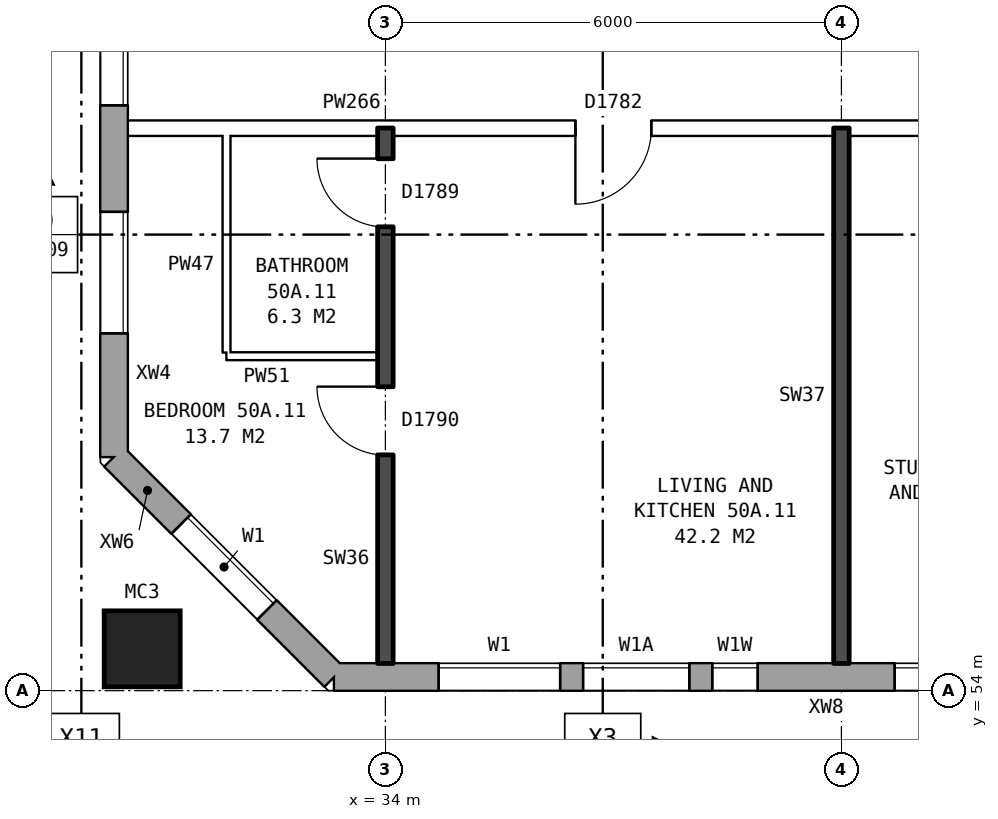
"""IFC4 building model, lengths in metres.
Left out: names, types, materials, properties, quantities, classifications, styles, units other than length and angle.
Written with IfcOpenShell. Run it as: python <this file> out.ifc"""

import sys

from ifc_helpers import new_model, si_unit, direction, frame, frame_2d, origin, origin_2d, place, context, subcontext, project, spatial, rectangle, hollow_rectangle, extrude, element, fill, save


model = new_model("IFC4")
c1 = context("Model", 3, precision=1e-05, world=origin(), true_north=direction((0.0, 1.0)))
c2 = subcontext(c1, "Body", "Model", "MODEL_VIEW")
j1 = project(units=[si_unit("LENGTHUNIT", "METRE"), si_unit("PLANEANGLEUNIT", "RADIAN")], contexts=[c1])
p1 = place(None, origin())
s1 = spatial("IfcSite", under=j1, at=p1, CompositionType="ELEMENT")
p2 = place(p1, origin())
s2 = spatial("IfcBuilding", under=s1, at=p2, CompositionType="ELEMENT")
p3 = place(p2, frame((0.0, 0.0, 178.9)))
s3 = spatial("IfcBuildingStorey", under=s2, at=p3, CompositionType="ELEMENT", Elevation=178.9)
p4 = place(p3, frame((30.8, 54.55, 0.0), z_axis=(0.0, 0.0, 1.0), x_axis=(1.0, 0.0, 0.0)))
e1 = element("IfcColumn", 1, at=p4, inside=s3, PredefinedType="COLUMN", context=c2, shape_type="SweptSolid", body=[
    extrude(hollow_rectangle(XDim=1.0, YDim=1.0, WallThickness=0.055, at=origin_2d()), origin(), (0.0, 0.0, 1.0), 3.1),
])
p5 = place(p3, frame((30.43, 57.075, 0.0), z_axis=(0.0, 0.0, 1.0), x_axis=(0.707106781187, -0.707106781187, 0.0)))
e2 = element("IfcWall", 2, at=p5, inside=s3, PredefinedType="STANDARD", context=c2, shape_type="SweptSolid", body=[
    extrude(rectangle(XDim=4.094, YDim=0.36, at=frame_2d((2.047, 0.0))), origin(), (0.0, 0.0, 1.0), 2.85),
])
p6 = place(p5, frame((1.247, 0.0, 0.8)))
e3 = element("IfcOpeningElement", 3, at=p6, cuts=e2, PredefinedType="OPENING", context=c2, shape_type="SweptSolid", body=[
    extrude(rectangle(XDim=1.6, YDim=1.8, at=frame_2d((0.8, 0.9))), frame((0.0, 0.19, 0.0), z_axis=(0.0, -1.0, 0.0), x_axis=(1.0, 0.0, 0.0)), (0.0, 0.0, 1.0), 0.38),
])
p7 = place(p3, frame((33.325, 54.18, 0.0), z_axis=(0.0, 0.0, 1.0), x_axis=(1.0, 0.0, 0.0)))
e4 = element("IfcWall", 4, at=p7, inside=s3, PredefinedType="STANDARD", context=c2, shape_type="SweptSolid", body=[
    extrude(rectangle(XDim=39.601, YDim=0.36, at=frame_2d((19.8, 0.0))), origin(), (0.0, 0.0, 1.0), 2.85),
])
p8 = place(p7, frame((1.375, 0.0, 0.8)))
e5 = element("IfcOpeningElement", 5, at=p8, cuts=e4, PredefinedType="OPENING", context=c2, shape_type="SweptSolid", body=[
    extrude(rectangle(XDim=1.6, YDim=1.8, at=frame_2d((0.8, 0.9))), frame((0.0, 0.19, 0.0), z_axis=(0.0, -1.0, 0.0), x_axis=(1.0, 0.0, 0.0)), (0.0, 0.0, 1.0), 0.38),
])
p9 = place(p7, frame((3.275, 0.0, 0.8)))
e6 = element("IfcOpeningElement", 6, at=p9, cuts=e4, PredefinedType="OPENING", context=c2, shape_type="SweptSolid", body=[
    extrude(rectangle(XDim=1.4, YDim=1.8, at=frame_2d((0.7, 0.9))), frame((0.0, 0.19, 0.0), z_axis=(0.0, -1.0, 0.0), x_axis=(1.0, 0.0, 0.0)), (0.0, 0.0, 1.0), 0.38),
])
p10 = place(p7, frame((7.375, 0.0, 0.8)))
e7 = element("IfcOpeningElement", 7, at=p10, cuts=e4, PredefinedType="OPENING", context=c2, shape_type="SweptSolid", body=[
    extrude(rectangle(XDim=1.6, YDim=1.8, at=frame_2d((0.8, 0.9))), frame((0.0, 0.19, 0.0), z_axis=(0.0, -1.0, 0.0), x_axis=(1.0, 0.0, 0.0)), (0.0, 0.0, 1.0), 0.38),
])
p11 = place(p7, frame((10.375, 0.0, 0.8)))
e8 = element("IfcOpeningElement", 8, at=p11, cuts=e4, PredefinedType="OPENING", context=c2, shape_type="SweptSolid", body=[
    extrude(rectangle(XDim=1.6, YDim=1.8, at=frame_2d((0.8, 0.9))), frame((0.0, 0.19, 0.0), z_axis=(0.0, -1.0, 0.0), x_axis=(1.0, 0.0, 0.0)), (0.0, 0.0, 1.0), 0.38),
])
p12 = place(p7, frame((13.375, 0.0, 0.8)))
e9 = element("IfcOpeningElement", 9, at=p12, cuts=e4, PredefinedType="OPENING", context=c2, shape_type="SweptSolid", body=[
    extrude(rectangle(XDim=1.6, YDim=1.8, at=frame_2d((0.8, 0.9))), frame((0.0, 0.19, 0.0), z_axis=(0.0, -1.0, 0.0), x_axis=(1.0, 0.0, 0.0)), (0.0, 0.0, 1.0), 0.38),
])
p13 = place(p7, frame((16.375, 0.0, 0.8)))
e10 = element("IfcOpeningElement", 10, at=p13, cuts=e4, PredefinedType="OPENING", context=c2, shape_type="SweptSolid", body=[
    extrude(rectangle(XDim=1.6, YDim=1.8, at=frame_2d((0.8, 0.9))), frame((0.0, 0.19, 0.0), z_axis=(0.0, -1.0, 0.0), x_axis=(1.0, 0.0, 0.0)), (0.0, 0.0, 1.0), 0.38),
])
p14 = place(p7, frame((19.375, 0.0, 0.8)))
e11 = element("IfcOpeningElement", 11, at=p14, cuts=e4, PredefinedType="OPENING", context=c2, shape_type="SweptSolid", body=[
    extrude(rectangle(XDim=1.6, YDim=1.8, at=frame_2d((0.8, 0.9))), frame((0.0, 0.19, 0.0), z_axis=(0.0, -1.0, 0.0), x_axis=(1.0, 0.0, 0.0)), (0.0, 0.0, 1.0), 0.38),
])
p15 = place(p7, frame((22.375, 0.0, 0.8)))
e12 = element("IfcOpeningElement", 12, at=p15, cuts=e4, PredefinedType="OPENING", context=c2, shape_type="SweptSolid", body=[
    extrude(rectangle(XDim=1.6, YDim=1.8, at=frame_2d((0.8, 0.9))), frame((0.0, 0.19, 0.0), z_axis=(0.0, -1.0, 0.0), x_axis=(1.0, 0.0, 0.0)), (0.0, 0.0, 1.0), 0.38),
])
p16 = place(p7, frame((25.375, 0.0, 0.8)))
e13 = element("IfcOpeningElement", 13, at=p16, cuts=e4, PredefinedType="OPENING", context=c2, shape_type="SweptSolid", body=[
    extrude(rectangle(XDim=1.6, YDim=1.8, at=frame_2d((0.8, 0.9))), frame((0.0, 0.19, 0.0), z_axis=(0.0, -1.0, 0.0), x_axis=(1.0, 0.0, 0.0)), (0.0, 0.0, 1.0), 0.38),
])
p17 = place(p7, frame((28.375, 0.0, 0.8)))
e14 = element("IfcOpeningElement", 14, at=p17, cuts=e4, PredefinedType="OPENING", context=c2, shape_type="SweptSolid", body=[
    extrude(rectangle(XDim=1.6, YDim=1.8, at=frame_2d((0.8, 0.9))), frame((0.0, 0.19, 0.0), z_axis=(0.0, -1.0, 0.0), x_axis=(1.0, 0.0, 0.0)), (0.0, 0.0, 1.0), 0.38),
])
p18 = place(p7, frame((30.875, 0.0, 0.8)))
e15 = element("IfcOpeningElement", 15, at=p18, cuts=e4, PredefinedType="OPENING", context=c2, shape_type="SweptSolid", body=[
    extrude(rectangle(XDim=1.0, YDim=1.8, at=frame_2d((0.5, 0.9))), frame((0.0, 0.19, 0.0), z_axis=(0.0, -1.0, 0.0), x_axis=(1.0, 0.0, 0.0)), (0.0, 0.0, 1.0), 0.38),
])
p19 = place(p7, frame((32.175, 0.0, 0.8)))
e16 = element("IfcOpeningElement", 16, at=p19, cuts=e4, PredefinedType="OPENING", context=c2, shape_type="SweptSolid", body=[
    extrude(rectangle(XDim=0.6, YDim=0.9, at=frame_2d((0.3, 0.45))), frame((0.0, 0.19, 0.0), z_axis=(0.0, -1.0, 0.0), x_axis=(1.0, 0.0, 0.0)), (0.0, 0.0, 1.0), 0.38),
])
p20 = place(p7, frame((37.375, 0.0, 0.8)))
e17 = element("IfcOpeningElement", 17, at=p20, cuts=e4, PredefinedType="OPENING", context=c2, shape_type="SweptSolid", body=[
    extrude(rectangle(XDim=1.6, YDim=1.8, at=frame_2d((0.8, 0.9))), frame((0.0, 0.19, 0.0), z_axis=(0.0, -1.0, 0.0), x_axis=(1.0, 0.0, 0.0)), (0.0, 0.0, 1.0), 0.38),
])
p21 = place(p7, frame((4.975, 0.0, 1.6)))
e18 = element("IfcOpeningElement", 18, at=p21, cuts=e4, PredefinedType="OPENING", context=c2, shape_type="SweptSolid", body=[
    extrude(rectangle(XDim=0.6, YDim=0.9, at=frame_2d((0.3, 0.45))), frame((0.0, 0.19, 0.0), z_axis=(0.0, -1.0, 0.0), x_axis=(1.0, 0.0, 0.0)), (0.0, 0.0, 1.0), 0.38),
])
p22 = place(p7, frame((33.925, 0.0, 1.7)))
e19 = element("IfcOpeningElement", 19, at=p22, cuts=e4, PredefinedType="OPENING", context=c2, shape_type="SweptSolid", body=[
    extrude(rectangle(XDim=0.6, YDim=0.9, at=frame_2d((0.3, 0.45))), frame((0.0, 0.19, 0.0), z_axis=(0.0, -1.0, 0.0), x_axis=(1.0, 0.0, 0.0)), (0.0, 0.0, 1.0), 0.38),
])
p23 = place(p7, frame((34.825, 0.0, 0.8)))
e20 = element("IfcOpeningElement", 20, at=p23, cuts=e4, PredefinedType="OPENING", context=c2, shape_type="SweptSolid", body=[
    extrude(rectangle(XDim=1.6, YDim=1.8, at=frame_2d((0.8, 0.9))), frame((0.0, 0.19, 0.0), z_axis=(0.0, -1.0, 0.0), x_axis=(1.0, 0.0, 0.0)), (0.0, 0.0, 1.0), 0.38),
])
p24 = place(p3, frame((30.43, 82.925, 0.0), z_axis=(0.0, 0.0, 1.0), x_axis=(0.0, -1.0, 0.0)))
e21 = element("IfcWall", 21, at=p24, inside=s3, PredefinedType="STANDARD", context=c2, shape_type="SweptSolid", body=[
    extrude(rectangle(XDim=25.851, YDim=0.36, at=frame_2d((12.925, 0.0))), origin(), (0.0, 0.0, 1.0), 2.85),
])
p25 = place(p24, frame((1.625, 0.0, 0.8)))
e22 = element("IfcOpeningElement", 22, at=p25, cuts=e21, PredefinedType="OPENING", context=c2, shape_type="SweptSolid", body=[
    extrude(rectangle(XDim=1.6, YDim=1.8, at=frame_2d((0.8, 0.9))), frame((0.0, 0.19, 0.0), z_axis=(0.0, -1.0, 0.0), x_axis=(1.0, 0.0, 0.0)), (0.0, 0.0, 1.0), 0.38),
])
p26 = place(p24, frame((4.625, 0.0, 0.8)))
e23 = element("IfcOpeningElement", 23, at=p26, cuts=e21, PredefinedType="OPENING", context=c2, shape_type="SweptSolid", body=[
    extrude(rectangle(XDim=1.6, YDim=1.8, at=frame_2d((0.8, 0.9))), frame((0.0, 0.19, 0.0), z_axis=(0.0, -1.0, 0.0), x_axis=(1.0, 0.0, 0.0)), (0.0, 0.0, 1.0), 0.38),
])
p27 = place(p24, frame((6.525, 0.0, 0.8)))
e24 = element("IfcOpeningElement", 24, at=p27, cuts=e21, PredefinedType="OPENING", context=c2, shape_type="SweptSolid", body=[
    extrude(rectangle(XDim=1.4, YDim=1.8, at=frame_2d((0.7, 0.9))), frame((0.0, 0.19, 0.0), z_axis=(0.0, -1.0, 0.0), x_axis=(1.0, 0.0, 0.0)), (0.0, 0.0, 1.0), 0.38),
])
p28 = place(p24, frame((8.225, 0.0, 1.6)))
e25 = element("IfcOpeningElement", 25, at=p28, cuts=e21, PredefinedType="OPENING", context=c2, shape_type="SweptSolid", body=[
    extrude(rectangle(XDim=0.8, YDim=0.9, at=frame_2d((0.4, 0.45))), frame((0.0, 0.19, 0.0), z_axis=(0.0, -1.0, 0.0), x_axis=(1.0, 0.0, 0.0)), (0.0, 0.0, 1.0), 0.38),
])
p29 = place(p24, frame((10.075, 0.0, 0.8)))
e26 = element("IfcOpeningElement", 26, at=p29, cuts=e21, PredefinedType="OPENING", context=c2, shape_type="SweptSolid", body=[
    extrude(rectangle(XDim=1.0, YDim=0.9, at=frame_2d((0.5, 0.45))), frame((0.0, 0.19, 0.0), z_axis=(0.0, -1.0, 0.0), x_axis=(1.0, 0.0, 0.0)), (0.0, 0.0, 1.0), 0.38),
])
p30 = place(p24, frame((11.375, 0.0, 0.8)))
e27 = element("IfcOpeningElement", 27, at=p30, cuts=e21, PredefinedType="OPENING", context=c2, shape_type="SweptSolid", body=[
    extrude(rectangle(XDim=1.2, YDim=1.8, at=frame_2d((0.6, 0.9))), frame((0.0, 0.19, 0.0), z_axis=(0.0, -1.0, 0.0), x_axis=(1.0, 0.0, 0.0)), (0.0, 0.0, 1.0), 0.38),
])
p31 = place(p24, frame((19.625, 0.0, 0.8)))
e28 = element("IfcOpeningElement", 28, at=p31, cuts=e21, PredefinedType="OPENING", context=c2, shape_type="SweptSolid", body=[
    extrude(rectangle(XDim=1.6, YDim=1.8, at=frame_2d((0.8, 0.9))), frame((0.0, 0.19, 0.0), z_axis=(0.0, -1.0, 0.0), x_axis=(1.0, 0.0, 0.0)), (0.0, 0.0, 1.0), 0.38),
])
p32 = place(p24, frame((22.625, 0.0, 0.8)))
e29 = element("IfcOpeningElement", 29, at=p32, cuts=e21, PredefinedType="OPENING", context=c2, shape_type="SweptSolid", body=[
    extrude(rectangle(XDim=1.6, YDim=1.8, at=frame_2d((0.8, 0.9))), frame((0.0, 0.19, 0.0), z_axis=(0.0, -1.0, 0.0), x_axis=(1.0, 0.0, 0.0)), (0.0, 0.0, 1.0), 0.38),
])
p33 = place(p24, frame((12.875, 0.0, 0.8)))
e30 = element("IfcOpeningElement", 30, at=p33, cuts=e21, PredefinedType="OPENING", context=c2, shape_type="SweptSolid", body=[
    extrude(rectangle(XDim=1.6, YDim=1.8, at=frame_2d((0.8, 0.9))), frame((0.0, 0.19, 0.0), z_axis=(0.0, -1.0, 0.0), x_axis=(1.0, 0.0, 0.0)), (0.0, 0.0, 1.0), 0.38),
])
p34 = place(p24, frame((14.775, 0.0, 0.8)))
e31 = element("IfcOpeningElement", 31, at=p34, cuts=e21, PredefinedType="OPENING", context=c2, shape_type="SweptSolid", body=[
    extrude(rectangle(XDim=1.0, YDim=0.9, at=frame_2d((0.5, 0.45))), frame((0.0, 0.19, 0.0), z_axis=(0.0, -1.0, 0.0), x_axis=(1.0, 0.0, 0.0)), (0.0, 0.0, 1.0), 0.38),
])
p35 = place(p24, frame((16.675, 0.0, 1.7)))
e32 = element("IfcOpeningElement", 32, at=p35, cuts=e21, PredefinedType="OPENING", context=c2, shape_type="SweptSolid", body=[
    extrude(rectangle(XDim=0.8, YDim=0.9, at=frame_2d((0.4, 0.45))), frame((0.0, 0.19, 0.0), z_axis=(0.0, -1.0, 0.0), x_axis=(1.0, 0.0, 0.0)), (0.0, 0.0, 1.0), 0.38),
])
p36 = place(p24, frame((17.925, 0.0, 0.8)))
e33 = element("IfcOpeningElement", 33, at=p36, cuts=e21, PredefinedType="OPENING", context=c2, shape_type="SweptSolid", body=[
    extrude(rectangle(XDim=1.4, YDim=1.8, at=frame_2d((0.7, 0.9))), frame((0.0, 0.19, 0.0), z_axis=(0.0, -1.0, 0.0), x_axis=(1.0, 0.0, 0.0)), (0.0, 0.0, 1.0), 0.38),
])
p37 = place(p3, frame((31.91, 58.4, 0.0), z_axis=(0.0, 0.0, 1.0), x_axis=(1.0, 0.0, 0.0)))
e34 = element("IfcWall", 34, at=p37, inside=s3, PredefinedType="PARTITIONING", context=c2, shape_type="SweptSolid", body=[
    extrude(rectangle(XDim=1.99, YDim=0.1, at=frame_2d((0.995, 0.0))), origin(), (0.0, 0.0, 1.0), 2.85),
])
p38 = place(p3, frame((30.61, 61.4, 0.0), z_axis=(0.0, 0.0, 1.0), x_axis=(1.0, 0.0, 0.0)))
e35 = element("IfcWall", 35, at=p38, inside=s3, PredefinedType="PARTITIONING", context=c2, shape_type="SweptSolid", body=[
    extrude(rectangle(XDim=15.29, YDim=0.2, at=frame_2d((7.645, 0.0))), origin(), (0.0, 0.0, 1.0), 2.85),
])
p39 = place(p38, frame((10.69, 0.0, 0.0)))
e36 = element("IfcOpeningElement", 36, at=p39, cuts=e35, PredefinedType="OPENING", context=c2, shape_type="SweptSolid", body=[
    extrude(rectangle(XDim=1.0, YDim=2.1, at=frame_2d((0.5, 1.05))), frame((0.0, 0.11, 0.0), z_axis=(0.0, -1.0, 0.0), x_axis=(1.0, 0.0, 0.0)), (0.0, 0.0, 1.0), 0.22),
])
p40 = place(p38, frame((5.89, 0.0, 0.0)))
e37 = element("IfcOpeningElement", 37, at=p40, cuts=e35, PredefinedType="OPENING", context=c2, shape_type="SweptSolid", body=[
    extrude(rectangle(XDim=1.0, YDim=2.1, at=frame_2d((0.5, 1.05))), frame((0.0, 0.11, 0.0), z_axis=(0.0, -1.0, 0.0), x_axis=(1.0, 0.0, 0.0)), (0.0, 0.0, 1.0), 0.22),
])
p41 = place(p3, frame((31.91, 58.45, 0.0), z_axis=(0.0, 0.0, 1.0), x_axis=(0.0, 1.0, 0.0)))
e38 = element("IfcWall", 38, at=p41, inside=s3, PredefinedType="PARTITIONING", context=c2, shape_type="SweptSolid", body=[
    extrude(rectangle(XDim=2.85, YDim=0.1, at=frame_2d((1.425, 0.0))), origin(), (0.0, 0.0, 1.0), 2.85),
])
p42 = place(p3, frame((34.0, 54.36, 0.0), z_axis=(0.0, 0.0, 1.0), x_axis=(0.0, 1.0, 0.0)))
e39 = element("IfcWall", 39, at=p42, inside=s3, PredefinedType="SOLIDWALL", context=c2, shape_type="SweptSolid", body=[
    extrude(rectangle(XDim=7.04, YDim=0.2, at=frame_2d((3.52, 0.0))), origin(), (0.0, 0.0, 1.0), 2.85),
])
p43 = place(p42, frame((2.74, 0.0, 0.0)))
e40 = element("IfcOpeningElement", 40, at=p43, cuts=e39, PredefinedType="OPENING", context=c2, shape_type="SweptSolid", body=[
    extrude(rectangle(XDim=0.9, YDim=2.1, at=frame_2d((0.45, 1.05))), frame((0.0, 0.11, 0.0), z_axis=(0.0, -1.0, 0.0), x_axis=(1.0, 0.0, 0.0)), (0.0, 0.0, 1.0), 0.22),
])
p44 = place(p42, frame((5.74, 0.0, 0.0)))
e41 = element("IfcOpeningElement", 41, at=p44, cuts=e39, PredefinedType="OPENING", context=c2, shape_type="SweptSolid", body=[
    extrude(rectangle(XDim=0.9, YDim=2.1, at=frame_2d((0.45, 1.05))), frame((0.0, 0.11, 0.0), z_axis=(0.0, -1.0, 0.0), x_axis=(1.0, 0.0, 0.0)), (0.0, 0.0, 1.0), 0.22),
])
p45 = place(p3, frame((40.0, 54.36, 0.0), z_axis=(0.0, 0.0, 1.0), x_axis=(0.0, 1.0, 0.0)))
e42 = element("IfcWall", 42, at=p45, inside=s3, PredefinedType="SOLIDWALL", context=c2, shape_type="SweptSolid", body=[
    extrude(rectangle(XDim=7.04, YDim=0.2, at=frame_2d((3.52, 0.0))), origin(), (0.0, 0.0, 1.0), 2.85),
])
p46 = place(p6, origin())
e43 = element("IfcWindow", 43, at=p46, inside=s3, PartitioningType="SINGLE_PANEL", PredefinedType="WINDOW", context=c2, shape_type="SweptSolid", body=[
    extrude(rectangle(XDim=1.6, YDim=1.8, at=frame_2d((0.8, 0.9))), frame((0.0, 0.15, 0.0), z_axis=(0.0, -1.0, 0.0), x_axis=(1.0, 0.0, 0.0)), (0.0, 0.0, 1.0), 0.06),
])
fill(e3, e43)
p47 = place(p8, origin())
e44 = element("IfcWindow", 44, at=p47, inside=s3, PartitioningType="SINGLE_PANEL", PredefinedType="WINDOW", context=c2, shape_type="SweptSolid", body=[
    extrude(rectangle(XDim=1.6, YDim=1.8, at=frame_2d((0.8, 0.9))), frame((0.0, 0.15, 0.0), z_axis=(0.0, -1.0, 0.0), x_axis=(1.0, 0.0, 0.0)), (0.0, 0.0, 1.0), 0.06),
])
fill(e5, e44)
p48 = place(p9, origin())
e45 = element("IfcWindow", 45, at=p48, inside=s3, PartitioningType="SINGLE_PANEL", PredefinedType="WINDOW", context=c2, shape_type="SweptSolid", body=[
    extrude(rectangle(XDim=1.4, YDim=1.8, at=frame_2d((0.7, 0.9))), frame((0.0, 0.15, 0.0), z_axis=(0.0, -1.0, 0.0), x_axis=(1.0, 0.0, 0.0)), (0.0, 0.0, 1.0), 0.06),
])
fill(e6, e45)
p49 = place(p10, origin())
e46 = element("IfcWindow", 46, at=p49, inside=s3, PartitioningType="SINGLE_PANEL", PredefinedType="WINDOW", context=c2, shape_type="SweptSolid", body=[
    extrude(rectangle(XDim=1.6, YDim=1.8, at=frame_2d((0.8, 0.9))), frame((0.0, 0.15, 0.0), z_axis=(0.0, -1.0, 0.0), x_axis=(1.0, 0.0, 0.0)), (0.0, 0.0, 1.0), 0.06),
])
fill(e7, e46)
p50 = place(p31, origin())
e47 = element("IfcWindow", 47, at=p50, inside=s3, PartitioningType="SINGLE_PANEL", PredefinedType="WINDOW", context=c2, shape_type="SweptSolid", body=[
    extrude(rectangle(XDim=1.6, YDim=1.8, at=frame_2d((0.8, 0.9))), frame((0.0, 0.15, 0.0), z_axis=(0.0, -1.0, 0.0), x_axis=(1.0, 0.0, 0.0)), (0.0, 0.0, 1.0), 0.06),
])
fill(e28, e47)
p51 = place(p32, origin())
e48 = element("IfcWindow", 48, at=p51, inside=s3, PartitioningType="SINGLE_PANEL", PredefinedType="WINDOW", context=c2, shape_type="SweptSolid", body=[
    extrude(rectangle(XDim=1.6, YDim=1.8, at=frame_2d((0.8, 0.9))), frame((0.0, 0.15, 0.0), z_axis=(0.0, -1.0, 0.0), x_axis=(1.0, 0.0, 0.0)), (0.0, 0.0, 1.0), 0.06),
])
fill(e29, e48)
p52 = place(p43, origin())
e49 = element("IfcDoor", 49, at=p52, inside=s3, OperationType="SINGLE_SWING_RIGHT", PredefinedType="DOOR", context=c2, shape_type="SweptSolid", body=[
    extrude(rectangle(XDim=0.9, YDim=2.1, at=frame_2d((0.45, 1.05))), frame((0.0, 0.025, 0.0), z_axis=(0.0, -1.0, 0.0), x_axis=(1.0, 0.0, 0.0)), (0.0, 0.0, 1.0), 0.05),
])
fill(e40, e49)
p53 = place(p40, frame((1.0, 0.0, 0.0), z_axis=(0.0, 0.0, 1.0), x_axis=(-1.0, 0.0, 0.0)))
e50 = element("IfcDoor", 50, at=p53, inside=s3, OperationType="SINGLE_SWING_RIGHT", PredefinedType="DOOR", context=c2, shape_type="SweptSolid", body=[
    extrude(rectangle(XDim=1.0, YDim=2.1, at=frame_2d((0.5, 1.05))), frame((0.0, 0.025, 0.0), z_axis=(0.0, -1.0, 0.0), x_axis=(1.0, 0.0, 0.0)), (0.0, 0.0, 1.0), 0.05),
])
fill(e37, e50)
p54 = place(p44, origin())
e51 = element("IfcDoor", 51, at=p54, inside=s3, OperationType="SINGLE_SWING_RIGHT", PredefinedType="DOOR", context=c2, shape_type="SweptSolid", body=[
    extrude(rectangle(XDim=0.9, YDim=2.1, at=frame_2d((0.45, 1.05))), frame((0.0, 0.025, 0.0), z_axis=(0.0, -1.0, 0.0), x_axis=(1.0, 0.0, 0.0)), (0.0, 0.0, 1.0), 0.05),
])
fill(e41, e51)
p55 = place(p21, origin())
e52 = element("IfcWindow", 52, at=p55, inside=s3, PartitioningType="SINGLE_PANEL", PredefinedType="WINDOW", context=c2, shape_type="SweptSolid", body=[
    extrude(rectangle(XDim=0.6, YDim=0.9, at=frame_2d((0.3, 0.45))), frame((0.0, 0.15, 0.0), z_axis=(0.0, -1.0, 0.0), x_axis=(1.0, 0.0, 0.0)), (0.0, 0.0, 1.0), 0.06),
])
fill(e18, e52)
save(model, sys.argv[1])
